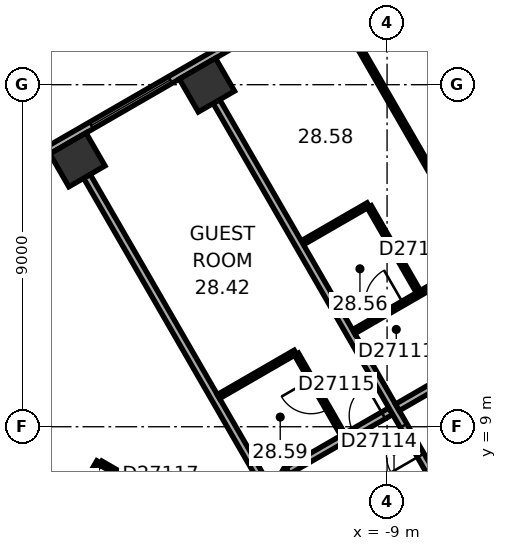
"""IFC4 building model, lengths in metres.
Left out: names, types, materials, properties, quantities, classifications, styles, units other than length and angle.
Written with IfcOpenShell. Run it as: python <this file> out.ifc"""

import sys

from ifc_helpers import new_model, si_unit, direction, frame, frame_2d, origin, origin_2d, place, context, subcontext, project, spatial, rectangle, extrude, element, fill, save


model = new_model("IFC4")
c1 = context("Model", 3, precision=1e-05, world=origin(), true_north=direction((0.0, 1.0)))
c2 = subcontext(c1, "Body", "Model", "MODEL_VIEW")
j1 = project(units=[si_unit("LENGTHUNIT", "METRE"), si_unit("PLANEANGLEUNIT", "RADIAN")], contexts=[c1])
p1 = place(None, origin())
s1 = spatial("IfcSite", under=j1, at=p1, CompositionType="ELEMENT")
p2 = place(p1, origin())
s2 = spatial("IfcBuilding", under=s1, at=p2, CompositionType="ELEMENT")
p3 = place(p2, frame((0.0, 0.0, 116.6)))
s3 = spatial("IfcBuildingStorey", under=s2, at=p3, CompositionType="ELEMENT", Elevation=116.6)
for number, where, z_axis, x_axis in (
    (1, (-13.74, 17.99, 0.0), (0.0, 0.0, 1.0), (-0.866, -0.5, 0.0)),
    (2, (-17.148, 16.023, 0.0), (0.0, 0.0, 1.0), (-0.866, -0.5, 0.0)),
):
    element("IfcColumn", number, at=place(p3, frame(where, z_axis=z_axis, x_axis=x_axis)), inside=s3, PredefinedType="COLUMN", context=c2, shape_type="SweptSolid", body=[
        extrude(rectangle(XDim=1.1, YDim=1.0, at=origin_2d()), origin(), (0.0, 0.0, 1.0), 3.3),
    ])
p4 = place(p3, frame((0.3, 11.836, 0.0), z_axis=(0.0, 0.0, 1.0), x_axis=(-0.866021384402, -0.500006961711, 0.0)))
e3 = element("IfcWall", 3, at=p4, inside=s3, PredefinedType="SHEAR", context=c2, shape_type="SweptSolid", body=[
    extrude(rectangle(XDim=12.355, YDim=1.2, at=frame_2d((6.178, 0.0))), origin(), (0.0, 0.0, 1.0), 3.3),
])
p5 = place(p4, frame((6.378, 0.0, 0.0)))
e4 = element("IfcOpeningElement", 4, at=p5, cuts=e3, PredefinedType="OPENING", context=c2, shape_type="SweptSolid", body=[
    extrude(rectangle(XDim=1.5, YDim=2.1, at=frame_2d((0.75, 1.05))), frame((0.0, 0.61, 0.0), z_axis=(0.0, -1.0, 0.0), x_axis=(1.0, 0.0, 0.0)), (0.0, 0.0, 1.0), 1.22),
])
p6 = place(p4, frame((1.828, 0.0, 0.0)))
e5 = element("IfcOpeningElement", 5, at=p6, cuts=e3, PredefinedType="OPENING", context=c2, shape_type="SweptSolid", body=[
    extrude(rectangle(XDim=1.1, YDim=2.1, at=frame_2d((0.55, 1.05))), frame((0.0, 0.61, 0.0), z_axis=(0.0, -1.0, 0.0), x_axis=(1.0, 0.0, 0.0)), (0.0, 0.0, 1.0), 1.22),
])
p7 = place(p3, frame((-3.136, 24.805, 0.0), z_axis=(0.0, 0.0, 1.0), x_axis=(-0.866028291626, -0.499994998079, 0.0)))
e6 = element("IfcWall", 6, at=p7, inside=s3, PredefinedType="STANDARD", context=c2, shape_type="SweptSolid", body=[
    extrude(rectangle(XDim=21.246, YDim=0.2, at=frame_2d((10.623, 0.0))), origin(), (0.0, 0.0, 1.0), 3.3),
])
p8 = place(p7, frame((1.555, 0.0, 0.8)))
e7 = element("IfcOpeningElement", 7, at=p8, cuts=e6, PredefinedType="OPENING", context=c2, shape_type="SweptSolid", body=[
    extrude(rectangle(XDim=2.4, YDim=1.7, at=frame_2d((1.2, 0.85))), frame((0.0, 0.11, 0.0), z_axis=(0.0, -1.0, 0.0), x_axis=(1.0, 0.0, 0.0)), (0.0, 0.0, 1.0), 0.22),
])
p9 = place(p7, frame((5.489, 0.0, 0.8)))
e8 = element("IfcOpeningElement", 8, at=p9, cuts=e6, PredefinedType="OPENING", context=c2, shape_type="SweptSolid", body=[
    extrude(rectangle(XDim=2.4, YDim=1.7, at=frame_2d((1.2, 0.85))), frame((0.0, 0.11, 0.0), z_axis=(0.0, -1.0, 0.0), x_axis=(1.0, 0.0, 0.0)), (0.0, 0.0, 1.0), 0.22),
])
p10 = place(p7, frame((9.424, 0.0, 0.8)))
e9 = element("IfcOpeningElement", 9, at=p10, cuts=e6, PredefinedType="OPENING", context=c2, shape_type="SweptSolid", body=[
    extrude(rectangle(XDim=2.4, YDim=1.7, at=frame_2d((1.2, 0.85))), frame((0.0, 0.11, 0.0), z_axis=(0.0, -1.0, 0.0), x_axis=(1.0, 0.0, 0.0)), (0.0, 0.0, 1.0), 0.22),
])
p11 = place(p7, frame((13.358, 0.0, 0.8)))
e10 = element("IfcOpeningElement", 10, at=p11, cuts=e6, PredefinedType="OPENING", context=c2, shape_type="SweptSolid", body=[
    extrude(rectangle(XDim=2.4, YDim=1.7, at=frame_2d((1.2, 0.85))), frame((0.0, 0.11, 0.0), z_axis=(0.0, -1.0, 0.0), x_axis=(1.0, 0.0, 0.0)), (0.0, 0.0, 1.0), 0.22),
])
p12 = place(p7, frame((17.293, 0.0, 0.8)))
e11 = element("IfcOpeningElement", 11, at=p12, cuts=e6, PredefinedType="OPENING", context=c2, shape_type="SweptSolid", body=[
    extrude(rectangle(XDim=2.4, YDim=1.7, at=frame_2d((1.2, 0.85))), frame((0.0, 0.11, 0.0), z_axis=(0.0, -1.0, 0.0), x_axis=(1.0, 0.0, 0.0)), (0.0, 0.0, 1.0), 0.22),
])
p13 = place(p3, frame((-17.849, 5.885, 0.0), z_axis=(0.0, 0.0, 1.0), x_axis=(0.500034589094, 0.866005432841, 0.0)))
e12 = element("IfcWall", 12, at=p13, inside=s3, PredefinedType="PARTITIONING", context=c2, shape_type="SweptSolid", body=[
    extrude(rectangle(XDim=2.528, YDim=0.12, at=frame_2d((1.264, 0.0))), origin(), (0.0, 0.0, 1.0), 2.95),
])
p14 = place(p3, frame((-16.898, 15.59, 0.0), z_axis=(0.0, 0.0, 1.0), x_axis=(0.499994742786, -0.866028439017, 0.0)))
e13 = element("IfcWall", 13, at=p14, inside=s3, PredefinedType="PARTITIONING", context=c2, shape_type="SweptSolid", body=[
    extrude(rectangle(XDim=9.65, YDim=0.2, at=frame_2d((4.825, 0.0))), origin(), (0.0, 0.0, 1.0), 2.95),
])
p15 = place(p3, frame((-16.533, 8.044, 0.0), z_axis=(0.0, 0.0, 1.0), x_axis=(0.86601037836, -0.500026023896, 0.0)))
e14 = element("IfcWall", 14, at=p15, inside=s3, PredefinedType="PARTITIONING", context=c2, shape_type="SweptSolid", body=[
    extrude(rectangle(XDim=3.04, YDim=0.12, at=frame_2d((1.52, 0.0))), origin(), (0.0, 0.0, 1.0), 2.95),
])
p16 = place(p15, frame((1.07, 0.0, 0.0)))
e15 = element("IfcOpeningElement", 15, at=p16, cuts=e14, PredefinedType="OPENING", context=c2, shape_type="SweptSolid", body=[
    extrude(rectangle(XDim=0.9, YDim=2.1, at=frame_2d((0.45, 1.05))), frame((0.0, 0.07, 0.0), z_axis=(0.0, -1.0, 0.0), x_axis=(1.0, 0.0, 0.0)), (0.0, 0.0, 1.0), 0.14),
])
p17 = place(p3, frame((-13.436, 9.794, 0.0), z_axis=(0.0, 0.0, 1.0), x_axis=(0.866053246676, 0.499951771596, 0.0)))
e16 = element("IfcWall", 16, at=p17, inside=s3, PredefinedType="PARTITIONING", context=c2, shape_type="SweptSolid", body=[
    extrude(rectangle(XDim=2.335, YDim=0.12, at=frame_2d((1.167, 0.0))), origin(), (0.0, 0.0, 1.0), 2.95),
])
p18 = place(p3, frame((-11.65, 7.823, 0.0), z_axis=(0.0, 0.0, 1.0), x_axis=(-0.50012165622, -0.865955154139, 0.0)))
e17 = element("IfcWall", 17, at=p18, inside=s3, PredefinedType="PARTITIONING", context=c2, shape_type="SweptSolid", body=[
    extrude(rectangle(XDim=0.6, YDim=0.2, at=frame_2d((0.3, 0.0))), origin(), (0.0, 0.0, 1.0), 2.95),
])
p19 = place(p3, frame((-11.385, 10.909, 0.0), z_axis=(0.0, 0.0, 1.0), x_axis=(0.500077547548, -0.865980627057, 0.0)))
e18 = element("IfcWall", 18, at=p19, inside=s3, PredefinedType="PARTITIONING", context=c2, shape_type="SweptSolid", body=[
    extrude(rectangle(XDim=2.44, YDim=0.12, at=frame_2d((1.22, 0.0))), origin(), (0.0, 0.0, 1.0), 2.95),
])
p20 = place(p19, frame((0.77, 0.0, 0.0)))
e19 = element("IfcOpeningElement", 19, at=p20, cuts=e18, PredefinedType="OPENING", context=c2, shape_type="SweptSolid", body=[
    extrude(rectangle(XDim=0.9, YDim=2.1, at=frame_2d((0.45, 1.05))), frame((0.0, 0.07, 0.0), z_axis=(0.0, -1.0, 0.0), x_axis=(1.0, 0.0, 0.0)), (0.0, 0.0, 1.0), 0.14),
])
p21 = place(p3, frame((-10.053, 19.542, 0.0), z_axis=(0.0, 0.0, 1.0), x_axis=(0.49998952364, -0.866031452229, 0.0)))
e20 = element("IfcWall", 20, at=p21, inside=s3, PredefinedType="PARTITIONING", context=c2, shape_type="SweptSolid", body=[
    extrude(rectangle(XDim=6.99, YDim=0.12, at=frame_2d((3.495, 0.0))), origin(), (0.0, 0.0, 1.0), 2.15),
])
p22 = place(p3, frame((-9.497, 14.84, 0.0), z_axis=(0.0, 0.0, 1.0), x_axis=(-0.866041268327, -0.499972520799, 0.0)))
e21 = element("IfcWall", 21, at=p22, inside=s3, PredefinedType="PARTITIONING", context=c2, shape_type="SweptSolid", body=[
    extrude(rectangle(XDim=2.0, YDim=0.12, at=frame_2d((1.0, 0.0))), origin(), (0.0, 0.0, 1.0), 2.95),
])
p23 = place(p3, frame((-8.902, 9.41, 0.0), z_axis=(0.0, 0.0, 1.0), x_axis=(-0.866014299198, -0.500019233215, 0.0)))
e22 = element("IfcWall", 22, at=p23, inside=s3, PredefinedType="PARTITIONING", context=c2, shape_type="SweptSolid", body=[
    extrude(rectangle(XDim=3.133, YDim=0.2, at=frame_2d((1.567, 0.0))), origin(), (0.0, 0.0, 1.0), 2.95),
])
p24 = place(p23, frame((0.225, 0.0, 0.0)))
e23 = element("IfcOpeningElement", 23, at=p24, cuts=e22, PredefinedType="OPENING", context=c2, shape_type="SweptSolid", body=[
    extrude(rectangle(XDim=0.9, YDim=2.1, at=frame_2d((0.45, 1.05))), frame((0.0, 0.11, 0.0), z_axis=(0.0, -1.0, 0.0), x_axis=(1.0, 0.0, 0.0)), (0.0, 0.0, 1.0), 0.22),
])
p25 = place(p3, frame((-8.177, 12.553, 0.0), z_axis=(0.0, 0.0, 1.0), x_axis=(-0.500006411147, 0.866021702275, 0.0)))
e24 = element("IfcWall", 24, at=p25, inside=s3, PredefinedType="PARTITIONING", context=c2, shape_type="SweptSolid", body=[
    extrude(rectangle(XDim=2.58, YDim=0.12, at=frame_2d((1.29, 0.0))), origin(), (0.0, 0.0, 1.0), 2.95),
])
p26 = place(p3, frame((-7.865, 7.814, 0.0), z_axis=(0.0, 0.0, 1.0), x_axis=(-0.500004234368, 0.866022959057, 0.0)))
e25 = element("IfcWall", 25, at=p26, inside=s3, PredefinedType="PARTITIONING", context=c2, shape_type="SweptSolid", body=[
    extrude(rectangle(XDim=11.25, YDim=0.2, at=frame_2d((5.625, 0.0))), origin(), (0.0, 0.0, 1.0), 2.95),
])
p27 = place(p26, frame((0.5, 0.0, 0.0)))
e26 = element("IfcOpeningElement", 26, at=p27, cuts=e25, PredefinedType="OPENING", context=c2, shape_type="SweptSolid", body=[
    extrude(rectangle(XDim=0.9, YDim=2.1, at=frame_2d((0.45, 1.05))), frame((0.0, 0.11, 0.0), z_axis=(0.0, -1.0, 0.0), x_axis=(1.0, 0.0, 0.0)), (0.0, 0.0, 1.0), 0.22),
])
p28 = place(p3, frame((-4.309, 12.061, 0.0), z_axis=(0.0, 0.0, 1.0), x_axis=(-0.866020679205, -0.500008183122, 0.0)))
e27 = element("IfcWall", 27, at=p28, inside=s3, PredefinedType="PARTITIONING", context=c2, shape_type="SweptSolid", body=[
    extrude(rectangle(XDim=5.104, YDim=0.2, at=frame_2d((2.552, 0.0))), origin(), (0.0, 0.0, 1.0), 2.95),
])
p29 = place(p28, frame((2.052, 0.0, 0.0)))
e28 = element("IfcOpeningElement", 28, at=p29, cuts=e27, PredefinedType="OPENING", context=c2, shape_type="SweptSolid", body=[
    extrude(rectangle(XDim=1.0, YDim=2.1, at=frame_2d((0.5, 1.05))), frame((0.0, 0.11, 0.0), z_axis=(0.0, -1.0, 0.0), x_axis=(1.0, 0.0, 0.0)), (0.0, 0.0, 1.0), 0.22),
])
p30 = place(p3, frame((-3.237, 15.336, 0.0), z_axis=(0.0, 0.0, 1.0), x_axis=(-0.866022840924, -0.500004438978, 0.0)))
e29 = element("IfcWall", 29, at=p30, inside=s3, PredefinedType="PARTITIONING", context=c2, shape_type="SweptSolid", body=[
    extrude(rectangle(XDim=7.669, YDim=0.12, at=frame_2d((3.835, 0.0))), origin(), (0.0, 0.0, 1.0), 2.95),
])
p31 = place(p30, frame((6.169, 0.0, 0.0)))
e30 = element("IfcOpeningElement", 30, at=p31, cuts=e29, PredefinedType="OPENING", context=c2, shape_type="SweptSolid", body=[
    extrude(rectangle(XDim=1.0, YDim=2.1, at=frame_2d((0.5, 1.05))), frame((0.0, 0.07, 0.0), z_axis=(0.0, -1.0, 0.0), x_axis=(1.0, 0.0, 0.0)), (0.0, 0.0, 1.0), 0.14),
])
p32 = place(p30, frame((2.65, 0.0, 0.0)))
e31 = element("IfcOpeningElement", 31, at=p32, cuts=e29, PredefinedType="OPENING", context=c2, shape_type="SweptSolid", body=[
    extrude(rectangle(XDim=0.9, YDim=2.1, at=frame_2d((0.45, 1.05))), frame((0.0, 0.07, 0.0), z_axis=(0.0, -1.0, 0.0), x_axis=(1.0, 0.0, 0.0)), (0.0, 0.0, 1.0), 0.14),
])
p33 = place(p30, frame((4.285, 0.0, 0.0)))
e32 = element("IfcOpeningElement", 32, at=p33, cuts=e29, PredefinedType="OPENING", context=c2, shape_type="SweptSolid", body=[
    extrude(rectangle(XDim=0.9, YDim=2.1, at=frame_2d((0.45, 1.05))), frame((0.0, 0.07, 0.0), z_axis=(0.0, -1.0, 0.0), x_axis=(1.0, 0.0, 0.0)), (0.0, 0.0, 1.0), 0.14),
])
p34 = place(p11, origin())
e33 = element("IfcWindow", 33, at=p34, inside=s3, PartitioningType="SINGLE_PANEL", PredefinedType="WINDOW", context=c2, shape_type="SweptSolid", body=[
    extrude(rectangle(XDim=2.4, YDim=1.7, at=frame_2d((1.2, 0.85))), frame((0.0, 0.03, 0.0), z_axis=(0.0, -1.0, 0.0), x_axis=(1.0, 0.0, 0.0)), (0.0, 0.0, 1.0), 0.06),
])
fill(e10, e33)
p35 = place(p31, origin())
e34 = element("IfcDoor", 34, at=p35, inside=s3, OperationType="SINGLE_SWING_LEFT", PredefinedType="DOOR", context=c2, shape_type="SweptSolid", body=[
    extrude(rectangle(XDim=1.0, YDim=2.1, at=frame_2d((0.5, 1.05))), frame((0.0, 0.025, 0.0), z_axis=(0.0, -1.0, 0.0), x_axis=(1.0, 0.0, 0.0)), (0.0, 0.0, 1.0), 0.05),
])
fill(e30, e34)
p36 = place(p24, origin())
e35 = element("IfcDoor", 35, at=p36, inside=s3, OperationType="SINGLE_SWING_LEFT", PredefinedType="DOOR", context=c2, shape_type="SweptSolid", body=[
    extrude(rectangle(XDim=0.9, YDim=2.1, at=frame_2d((0.45, 1.05))), frame((0.0, 0.025, 0.0), z_axis=(0.0, -1.0, 0.0), x_axis=(1.0, 0.0, 0.0)), (0.0, 0.0, 1.0), 0.05),
])
fill(e23, e35)
p37 = place(p20, origin())
e36 = element("IfcDoor", 36, at=p37, inside=s3, OperationType="SINGLE_SWING_LEFT", PredefinedType="DOOR", context=c2, shape_type="SweptSolid", body=[
    extrude(rectangle(XDim=0.9, YDim=2.1, at=frame_2d((0.45, 1.05))), frame((0.0, 0.025, 0.0), z_axis=(0.0, -1.0, 0.0), x_axis=(1.0, 0.0, 0.0)), (0.0, 0.0, 1.0), 0.05),
])
fill(e19, e36)
p38 = place(p27, origin())
e37 = element("IfcDoor", 37, at=p38, inside=s3, OperationType="SINGLE_SWING_LEFT", PredefinedType="DOOR", context=c2, shape_type="SweptSolid", body=[
    extrude(rectangle(XDim=0.9, YDim=2.1, at=frame_2d((0.45, 1.05))), frame((0.0, 0.025, 0.0), z_axis=(0.0, -1.0, 0.0), x_axis=(1.0, 0.0, 0.0)), (0.0, 0.0, 1.0), 0.05),
])
fill(e26, e37)
save(model, sys.argv[1])
